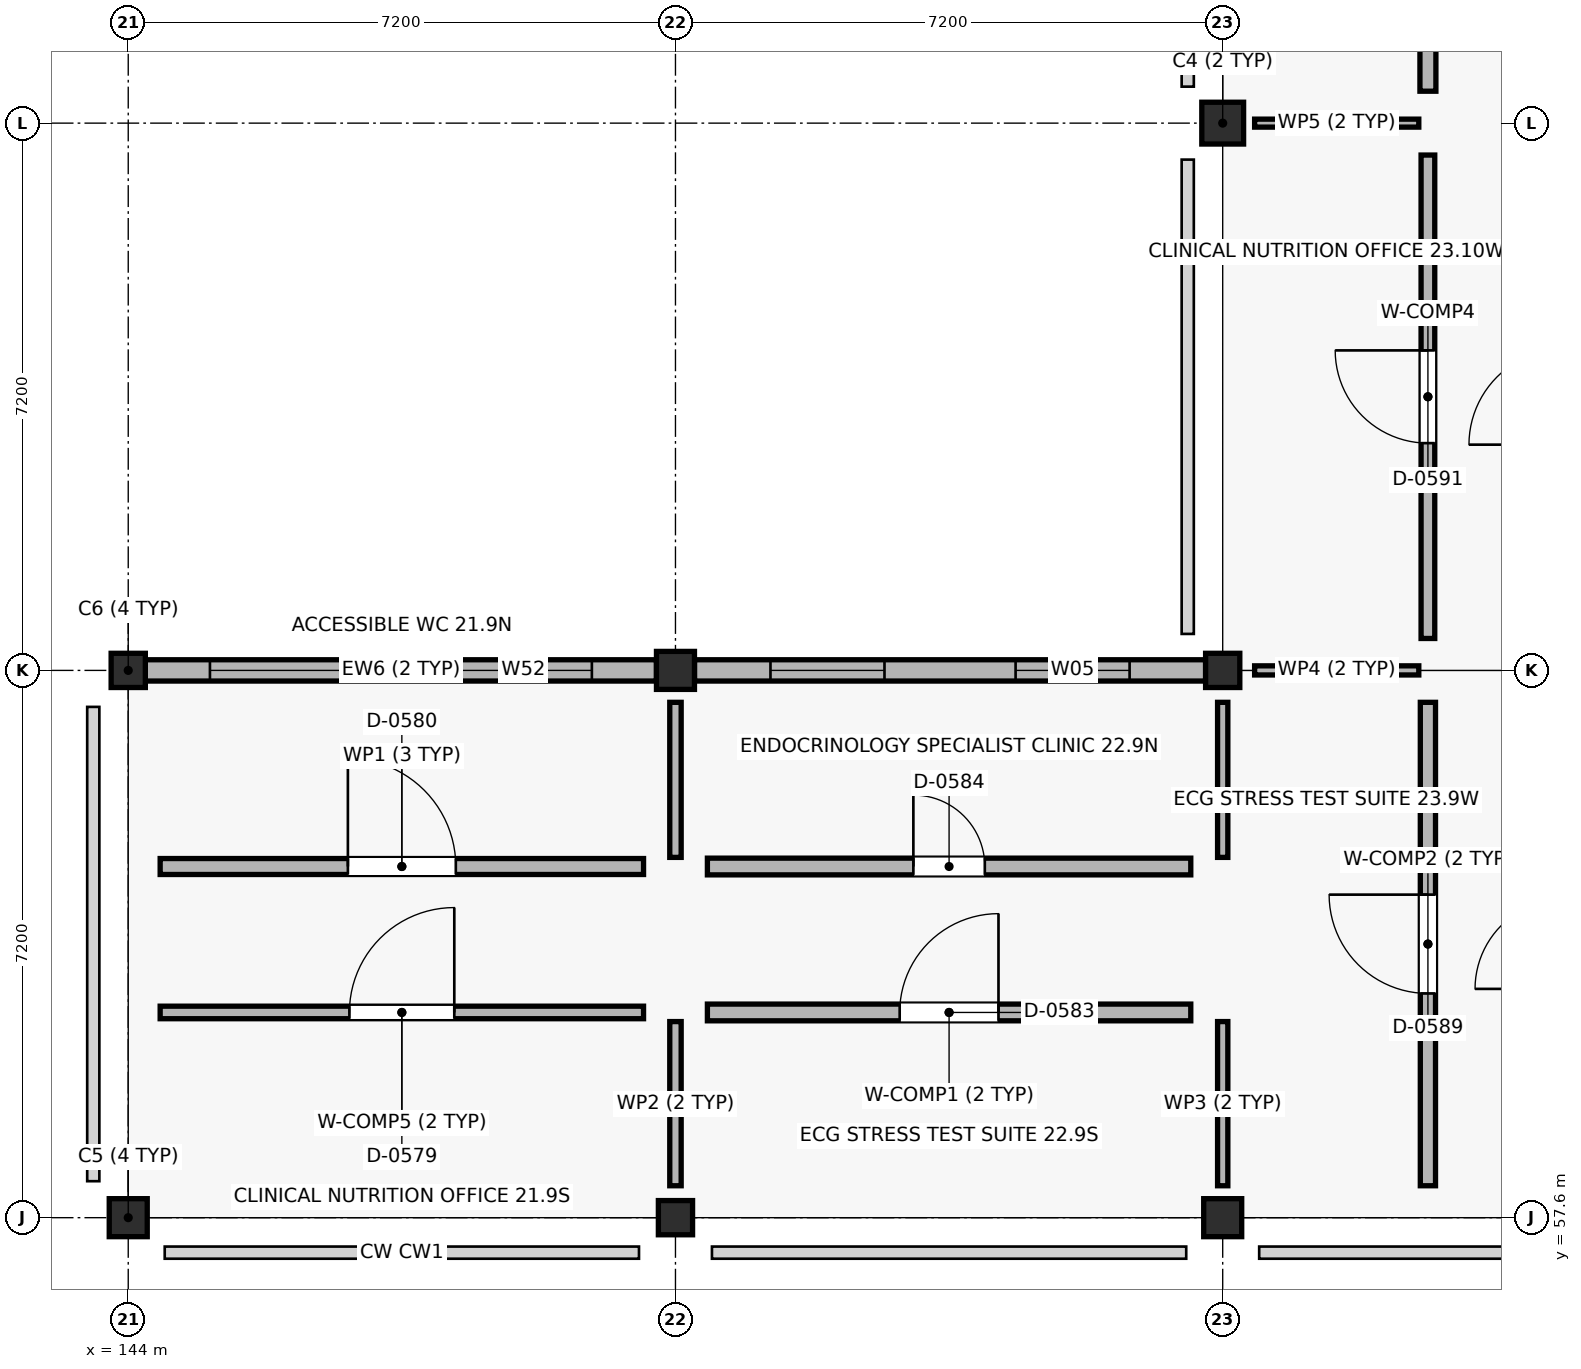
"""IFC4 building model, lengths in metres.
Left out: names, types, materials, properties, quantities, classifications, styles, units other than length and angle.
Written with IfcOpenShell. Run it as: python <this file> out.ifc"""

import sys

from ifc_helpers import new_model, si_unit, direction, frame, frame_2d, origin, origin_2d, place, context, subcontext, project, spatial, rectangle, extrude, element, fill, save


model = new_model("IFC4")
c1 = context("Model", 3, precision=1e-05, world=origin(), true_north=direction((0.0, 1.0)))
c2 = subcontext(c1, "Body", "Model", "MODEL_VIEW")
j1 = project(units=[si_unit("LENGTHUNIT", "METRE"), si_unit("PLANEANGLEUNIT", "RADIAN")], contexts=[c1])
p1 = place(None, origin())
s1 = spatial("IfcSite", under=j1, at=p1, CompositionType="ELEMENT")
p2 = place(p1, origin())
s2 = spatial("IfcBuilding", under=s1, at=p2, CompositionType="ELEMENT")
p3 = place(p2, frame((0.0, 0.0, 13.5)))
s3 = spatial("IfcBuildingStorey", under=s2, at=p3, CompositionType="ELEMENT", Elevation=13.5)
p4 = place(p3, frame((144.0, 57.6, 0.0), z_axis=(0.0, 0.0, 1.0), x_axis=(1.0, 0.0, 0.0)))
e1 = element("IfcColumn", 1, at=p4, inside=s3, PredefinedType="COLUMN", context=c2, shape_type="SweptSolid", body=[
    extrude(rectangle(XDim=0.5, YDim=0.5, at=origin_2d()), origin(), (0.0, 0.0, 1.0), 3.83),
])
for number, where, z_axis, x_axis in (
    (2, (144.0, 64.8, 0.0), (0.0, 0.0, 1.0), (1.0, 0.0, 0.0)),
    (3, (151.2, 57.6, 0.0), (0.0, 0.0, 1.0), (1.0, 0.0, 0.0)),
):
    element("IfcColumn", number, at=place(p3, frame(where, z_axis=z_axis, x_axis=x_axis)), inside=s3, PredefinedType="COLUMN", context=c2, shape_type="SweptSolid", body=[
        extrude(rectangle(XDim=0.45, YDim=0.45, at=origin_2d()), origin(), (0.0, 0.0, 1.0), 3.83),
    ])
for number, where, z_axis, x_axis in (
    (4, (151.2, 64.8, 0.0), (0.0, 0.0, 1.0), (1.0, 0.0, 0.0)),
    (5, (158.4, 57.6, 0.0), (0.0, 0.0, 1.0), (1.0, 0.0, 0.0)),
):
    element("IfcColumn", number, at=place(p3, frame(where, z_axis=z_axis, x_axis=x_axis)), inside=s3, PredefinedType="COLUMN", context=c2, shape_type="SweptSolid", body=[
        extrude(rectangle(XDim=0.5, YDim=0.5, at=origin_2d()), origin(), (0.0, 0.0, 1.0), 3.83),
    ])
p5 = place(p3, frame((158.4, 64.8, 0.0), z_axis=(0.0, 0.0, 1.0), x_axis=(1.0, 0.0, 0.0)))
e6 = element("IfcColumn", 6, at=p5, inside=s3, PredefinedType="COLUMN", context=c2, shape_type="SweptSolid", body=[
    extrude(rectangle(XDim=0.45, YDim=0.45, at=origin_2d()), origin(), (0.0, 0.0, 1.0), 3.83),
])
p6 = place(p3, frame((158.4, 72.0, 0.0), z_axis=(0.0, 0.0, 1.0), x_axis=(1.0, 0.0, 0.0)))
e7 = element("IfcColumn", 7, at=p6, inside=s3, PredefinedType="COLUMN", context=c2, shape_type="SweptSolid", body=[
    extrude(rectangle(XDim=0.55, YDim=0.55, at=origin_2d()), origin(), (0.0, 0.0, 1.0), 4.05),
])
p7 = place(p3, frame((150.95, 64.8, 0.0), z_axis=(0.0, 0.0, 1.0), x_axis=(-1.0, 0.0, 0.0)))
e8 = element("IfcWall", 8, at=p7, inside=s3, PredefinedType="STANDARD", context=c2, shape_type="SweptSolid", body=[
    extrude(rectangle(XDim=6.725, YDim=0.28, at=frame_2d((3.362, 0.0))), origin(), (0.0, 0.0, 1.0), 3.14),
])
p8 = place(p7, frame((0.85, 0.0, 0.9)))
e9 = element("IfcOpeningElement", 9, at=p8, cuts=e8, PredefinedType="OPENING", context=c2, shape_type="SweptSolid", body=[
    extrude(rectangle(XDim=1.8, YDim=1.88, at=frame_2d((0.9, 0.94))), frame((0.0, 0.15, 0.0), z_axis=(0.0, -1.0, 0.0), x_axis=(1.0, 0.0, 0.0)), (0.0, 0.0, 1.0), 0.3),
])
p9 = place(p7, frame((4.075, 0.0, 0.9)))
e10 = element("IfcOpeningElement", 10, at=p9, cuts=e8, PredefinedType="OPENING", context=c2, shape_type="SweptSolid", body=[
    extrude(rectangle(XDim=1.8, YDim=1.88, at=frame_2d((0.9, 0.94))), frame((0.0, 0.15, 0.0), z_axis=(0.0, -1.0, 0.0), x_axis=(1.0, 0.0, 0.0)), (0.0, 0.0, 1.0), 0.3),
])
p10 = place(p3, frame((158.175, 64.8, 0.0), z_axis=(0.0, 0.0, 1.0), x_axis=(-1.0, 0.0, 0.0)))
e11 = element("IfcWall", 11, at=p10, inside=s3, PredefinedType="STANDARD", context=c2, shape_type="SweptSolid", body=[
    extrude(rectangle(XDim=6.725, YDim=0.28, at=frame_2d((3.363, 0.0))), origin(), (0.0, 0.0, 1.0), 3.14),
])
p11 = place(p10, frame((1.0, 0.0, 0.9)))
e12 = element("IfcOpeningElement", 12, at=p11, cuts=e11, PredefinedType="OPENING", context=c2, shape_type="SweptSolid", body=[
    extrude(rectangle(XDim=1.5, YDim=1.25, at=frame_2d((0.75, 0.625))), frame((0.0, 0.15, 0.0), z_axis=(0.0, -1.0, 0.0), x_axis=(1.0, 0.0, 0.0)), (0.0, 0.0, 1.0), 0.3),
])
p12 = place(p10, frame((4.225, 0.0, 0.9)))
e13 = element("IfcOpeningElement", 13, at=p12, cuts=e11, PredefinedType="OPENING", context=c2, shape_type="SweptSolid", body=[
    extrude(rectangle(XDim=1.5, YDim=1.25, at=frame_2d((0.75, 0.625))), frame((0.0, 0.15, 0.0), z_axis=(0.0, -1.0, 0.0), x_axis=(1.0, 0.0, 0.0)), (0.0, 0.0, 1.0), 0.3),
])
p13 = place(p3, frame((144.42, 60.3, 0.0), z_axis=(0.0, 0.0, 1.0), x_axis=(1.0, 0.0, 0.0)))
e14 = element("IfcWall", 14, at=p13, inside=s3, PredefinedType="PARTITIONING", context=c2, shape_type="SweptSolid", body=[
    extrude(rectangle(XDim=6.36, YDim=0.165, at=frame_2d((3.18, 0.0))), origin(), (0.0, 0.0, 1.0), 2.93),
])
p14 = place(p13, frame((2.49, 0.0, 0.0)))
e15 = element("IfcOpeningElement", 15, at=p14, cuts=e14, PredefinedType="OPENING", context=c2, shape_type="SweptSolid", body=[
    extrude(rectangle(XDim=1.38, YDim=2.04, at=frame_2d((0.69, 1.02))), frame((0.0, 0.093, 0.0), z_axis=(0.0, -1.0, 0.0), x_axis=(1.0, 0.0, 0.0)), (0.0, 0.0, 1.0), 0.185),
])
p15 = place(p3, frame((151.2, 58.02, 0.0), z_axis=(0.0, 0.0, 1.0), x_axis=(0.0, 1.0, 0.0)))
e16 = element("IfcWall", 16, at=p15, inside=s3, PredefinedType="PARTITIONING", context=c2, shape_type="SweptSolid", body=[
    extrude(rectangle(XDim=2.16, YDim=0.15, at=frame_2d((1.08, 0.0))), origin(), (0.0, 0.0, 1.0), 2.93),
])
p16 = place(p3, frame((144.42, 62.22, 0.0), z_axis=(0.0, 0.0, 1.0), x_axis=(1.0, 0.0, 0.0)))
e17 = element("IfcWall", 17, at=p16, inside=s3, PredefinedType="PLUMBINGWALL", context=c2, shape_type="SweptSolid", body=[
    extrude(rectangle(XDim=6.36, YDim=0.21, at=frame_2d((3.18, 0.0))), origin(), (0.0, 0.0, 1.0), 2.93),
])
p17 = place(p16, frame((2.47, 0.0, 0.0)))
e18 = element("IfcOpeningElement", 18, at=p17, cuts=e17, PredefinedType="OPENING", context=c2, shape_type="SweptSolid", body=[
    extrude(rectangle(XDim=1.42, YDim=2.04, at=frame_2d((0.71, 1.02))), frame((0.0, 0.115, 0.0), z_axis=(0.0, -1.0, 0.0), x_axis=(1.0, 0.0, 0.0)), (0.0, 0.0, 1.0), 0.23),
])
p18 = place(p3, frame((151.2, 62.34, 0.0), z_axis=(0.0, 0.0, 1.0), x_axis=(0.0, 1.0, 0.0)))
e19 = element("IfcWall", 19, at=p18, inside=s3, PredefinedType="PARTITIONING", context=c2, shape_type="SweptSolid", body=[
    extrude(rectangle(XDim=2.04, YDim=0.15, at=frame_2d((1.02, 0.0))), origin(), (0.0, 0.0, 1.0), 2.93),
])
p19 = place(p3, frame((151.62, 60.3, 0.0), z_axis=(0.0, 0.0, 1.0), x_axis=(1.0, 0.0, 0.0)))
e20 = element("IfcWall", 20, at=p19, inside=s3, PredefinedType="SOLIDWALL", context=c2, shape_type="SweptSolid", body=[
    extrude(rectangle(XDim=6.36, YDim=0.22, at=frame_2d((3.18, 0.0))), origin(), (0.0, 0.0, 1.0), 2.93),
])
p20 = place(p19, frame((2.53, 0.0, 0.0)))
e21 = element("IfcOpeningElement", 21, at=p20, cuts=e20, PredefinedType="OPENING", context=c2, shape_type="SweptSolid", body=[
    extrude(rectangle(XDim=1.3, YDim=2.15, at=frame_2d((0.65, 1.075))), frame((0.0, 0.12, 0.0), z_axis=(0.0, -1.0, 0.0), x_axis=(1.0, 0.0, 0.0)), (0.0, 0.0, 1.0), 0.24),
])
p21 = place(p3, frame((158.4, 58.02, 0.0), z_axis=(0.0, 0.0, 1.0), x_axis=(0.0, 1.0, 0.0)))
e22 = element("IfcWall", 22, at=p21, inside=s3, PredefinedType="PARTITIONING", context=c2, shape_type="SweptSolid", body=[
    extrude(rectangle(XDim=2.16, YDim=0.135, at=frame_2d((1.08, 0.0))), origin(), (0.0, 0.0, 1.0), 2.93),
])
p22 = place(p3, frame((151.62, 62.22, 0.0), z_axis=(0.0, 0.0, 1.0), x_axis=(1.0, 0.0, 0.0)))
e23 = element("IfcWall", 23, at=p22, inside=s3, PredefinedType="SOLIDWALL", context=c2, shape_type="SweptSolid", body=[
    extrude(rectangle(XDim=6.36, YDim=0.22, at=frame_2d((3.18, 0.0))), origin(), (0.0, 0.0, 1.0), 2.93),
])
p23 = place(p22, frame((2.71, 0.0, 0.0)))
e24 = element("IfcOpeningElement", 24, at=p23, cuts=e23, PredefinedType="OPENING", context=c2, shape_type="SweptSolid", body=[
    extrude(rectangle(XDim=0.94, YDim=2.09, at=frame_2d((0.47, 1.045))), frame((0.0, 0.12, 0.0), z_axis=(0.0, -1.0, 0.0), x_axis=(1.0, 0.0, 0.0)), (0.0, 0.0, 1.0), 0.24),
])
p24 = place(p3, frame((158.4, 62.34, 0.0), z_axis=(0.0, 0.0, 1.0), x_axis=(0.0, 1.0, 0.0)))
e25 = element("IfcWall", 25, at=p24, inside=s3, PredefinedType="PARTITIONING", context=c2, shape_type="SweptSolid", body=[
    extrude(rectangle(XDim=2.04, YDim=0.135, at=frame_2d((1.02, 0.0))), origin(), (0.0, 0.0, 1.0), 2.93),
])
p25 = place(p3, frame((161.1, 58.02, 0.0), z_axis=(0.0, 0.0, 1.0), x_axis=(0.0, 1.0, 0.0)))
e26 = element("IfcWall", 26, at=p25, inside=s3, PredefinedType="SOLIDWALL", context=c2, shape_type="SweptSolid", body=[
    extrude(rectangle(XDim=6.36, YDim=0.2, at=frame_2d((3.18, 0.0))), origin(), (0.0, 0.0, 1.0), 2.93),
])
p26 = place(p25, frame((2.53, 0.0, 0.0)))
e27 = element("IfcOpeningElement", 27, at=p26, cuts=e26, PredefinedType="OPENING", context=c2, shape_type="SweptSolid", body=[
    extrude(rectangle(XDim=1.3, YDim=2.15, at=frame_2d((0.65, 1.075))), frame((0.0, 0.11, 0.0), z_axis=(0.0, -1.0, 0.0), x_axis=(1.0, 0.0, 0.0)), (0.0, 0.0, 1.0), 0.22),
])
p27 = place(p3, frame((158.82, 64.8, 0.0), z_axis=(0.0, 0.0, 1.0), x_axis=(1.0, 0.0, 0.0)))
e28 = element("IfcWall", 28, at=p27, inside=s3, PredefinedType="PARTITIONING", context=c2, shape_type="SweptSolid", body=[
    extrude(rectangle(XDim=2.16, YDim=0.12, at=frame_2d((1.08, 0.0))), origin(), (0.0, 0.0, 1.0), 2.93),
])
p28 = place(p3, frame((161.1, 65.22, 0.0), z_axis=(0.0, 0.0, 1.0), x_axis=(0.0, 1.0, 0.0)))
e29 = element("IfcWall", 29, at=p28, inside=s3, PredefinedType="PARTITIONING", context=c2, shape_type="SweptSolid", body=[
    extrude(rectangle(XDim=6.36, YDim=0.18, at=frame_2d((3.18, 0.0))), origin(), (0.0, 0.0, 1.0), 2.93),
])
p29 = place(p28, frame((2.57, 0.0, 0.0)))
e30 = element("IfcOpeningElement", 30, at=p29, cuts=e29, PredefinedType="OPENING", context=c2, shape_type="SweptSolid", body=[
    extrude(rectangle(XDim=1.22, YDim=2.09, at=frame_2d((0.61, 1.045))), frame((0.0, 0.1, 0.0), z_axis=(0.0, -1.0, 0.0), x_axis=(1.0, 0.0, 0.0)), (0.0, 0.0, 1.0), 0.2),
])
p30 = place(p3, frame((158.82, 72.0, 0.0), z_axis=(0.0, 0.0, 1.0), x_axis=(1.0, 0.0, 0.0)))
e31 = element("IfcWall", 31, at=p30, inside=s3, PredefinedType="PARTITIONING", context=c2, shape_type="SweptSolid", body=[
    extrude(rectangle(XDim=2.16, YDim=0.105, at=frame_2d((1.08, 0.0))), origin(), (0.0, 0.0, 1.0), 2.93),
])
p31 = place(p3, frame((161.1, 72.42, 0.0), z_axis=(0.0, 0.0, 1.0), x_axis=(0.0, 1.0, 0.0)))
e32 = element("IfcWall", 32, at=p31, inside=s3, PredefinedType="PLUMBINGWALL", context=c2, shape_type="SweptSolid", body=[
    extrude(rectangle(XDim=6.36, YDim=0.21, at=frame_2d((3.18, 0.0))), origin(), (0.0, 0.0, 1.0), 2.93),
])
p32 = place(p31, frame((2.53, 0.0, 0.0)))
e33 = element("IfcOpeningElement", 33, at=p32, cuts=e32, PredefinedType="OPENING", context=c2, shape_type="SweptSolid", body=[
    extrude(rectangle(XDim=1.3, YDim=2.09, at=frame_2d((0.65, 1.045))), frame((0.0, 0.115, 0.0), z_axis=(0.0, -1.0, 0.0), x_axis=(1.0, 0.0, 0.0)), (0.0, 0.0, 1.0), 0.23),
])
p33 = place(p8, origin())
e34 = element("IfcWindow", 34, at=p33, inside=s3, PartitioningType="SINGLE_PANEL", PredefinedType="WINDOW", context=c2, shape_type="SweptSolid", body=[
    extrude(rectangle(XDim=1.8, YDim=1.88, at=frame_2d((0.9, 0.94))), frame((0.0, 0.03, 0.0), z_axis=(0.0, -1.0, 0.0), x_axis=(1.0, 0.0, 0.0)), (0.0, 0.0, 1.0), 0.06),
])
fill(e9, e34)
p34 = place(p9, origin())
e35 = element("IfcWindow", 35, at=p34, inside=s3, PartitioningType="SINGLE_PANEL", PredefinedType="WINDOW", context=c2, shape_type="SweptSolid", body=[
    extrude(rectangle(XDim=1.8, YDim=1.88, at=frame_2d((0.9, 0.94))), frame((0.0, 0.03, 0.0), z_axis=(0.0, -1.0, 0.0), x_axis=(1.0, 0.0, 0.0)), (0.0, 0.0, 1.0), 0.06),
])
fill(e10, e35)
p35 = place(p11, origin())
e36 = element("IfcWindow", 36, at=p35, inside=s3, PartitioningType="SINGLE_PANEL", PredefinedType="WINDOW", context=c2, shape_type="SweptSolid", body=[
    extrude(rectangle(XDim=1.5, YDim=1.25, at=frame_2d((0.75, 0.625))), frame((0.0, 0.03, 0.0), z_axis=(0.0, -1.0, 0.0), x_axis=(1.0, 0.0, 0.0)), (0.0, 0.0, 1.0), 0.06),
])
fill(e12, e36)
p36 = place(p12, origin())
e37 = element("IfcWindow", 37, at=p36, inside=s3, PartitioningType="SINGLE_PANEL", PredefinedType="WINDOW", context=c2, shape_type="SweptSolid", body=[
    extrude(rectangle(XDim=1.5, YDim=1.25, at=frame_2d((0.75, 0.625))), frame((0.0, 0.03, 0.0), z_axis=(0.0, -1.0, 0.0), x_axis=(1.0, 0.0, 0.0)), (0.0, 0.0, 1.0), 0.06),
])
fill(e13, e37)
p37 = place(p14, origin())
e38 = element("IfcDoor", 38, at=p37, inside=s3, OperationType="SINGLE_SWING_RIGHT", PredefinedType="DOOR", context=c2, shape_type="SweptSolid", body=[
    extrude(rectangle(XDim=1.38, YDim=2.04, at=frame_2d((0.69, 1.02))), frame((0.0, 0.025, 0.0), z_axis=(0.0, -1.0, 0.0), x_axis=(1.0, 0.0, 0.0)), (0.0, 0.0, 1.0), 0.05),
])
fill(e15, e38)
p38 = place(p17, origin())
e39 = element("IfcDoor", 39, at=p38, inside=s3, OperationType="SINGLE_SWING_LEFT", PredefinedType="DOOR", context=c2, shape_type="SweptSolid", body=[
    extrude(rectangle(XDim=1.42, YDim=2.04, at=frame_2d((0.71, 1.02))), frame((0.0, 0.025, 0.0), z_axis=(0.0, -1.0, 0.0), x_axis=(1.0, 0.0, 0.0)), (0.0, 0.0, 1.0), 0.05),
])
fill(e18, e39)
p39 = place(p20, origin())
e40 = element("IfcDoor", 40, at=p39, inside=s3, OperationType="SINGLE_SWING_RIGHT", PredefinedType="DOOR", context=c2, shape_type="SweptSolid", body=[
    extrude(rectangle(XDim=1.3, YDim=2.15, at=frame_2d((0.65, 1.075))), frame((0.0, 0.025, 0.0), z_axis=(0.0, -1.0, 0.0), x_axis=(1.0, 0.0, 0.0)), (0.0, 0.0, 1.0), 0.05),
])
fill(e21, e40)
p40 = place(p23, origin())
e41 = element("IfcDoor", 41, at=p40, inside=s3, OperationType="SINGLE_SWING_LEFT", PredefinedType="DOOR", context=c2, shape_type="SweptSolid", body=[
    extrude(rectangle(XDim=0.94, YDim=2.09, at=frame_2d((0.47, 1.045))), frame((0.0, 0.025, 0.0), z_axis=(0.0, -1.0, 0.0), x_axis=(1.0, 0.0, 0.0)), (0.0, 0.0, 1.0), 0.05),
])
fill(e24, e41)
p41 = place(p26, origin())
e42 = element("IfcDoor", 42, at=p41, inside=s3, OperationType="SINGLE_SWING_RIGHT", PredefinedType="DOOR", context=c2, shape_type="SweptSolid", body=[
    extrude(rectangle(XDim=1.3, YDim=2.15, at=frame_2d((0.65, 1.075))), frame((0.0, 0.025, 0.0), z_axis=(0.0, -1.0, 0.0), x_axis=(1.0, 0.0, 0.0)), (0.0, 0.0, 1.0), 0.05),
])
fill(e27, e42)
p42 = place(p29, origin())
e43 = element("IfcDoor", 43, at=p42, inside=s3, OperationType="SINGLE_SWING_RIGHT", PredefinedType="DOOR", context=c2, shape_type="SweptSolid", body=[
    extrude(rectangle(XDim=1.22, YDim=2.09, at=frame_2d((0.61, 1.045))), frame((0.0, 0.025, 0.0), z_axis=(0.0, -1.0, 0.0), x_axis=(1.0, 0.0, 0.0)), (0.0, 0.0, 1.0), 0.05),
])
fill(e30, e43)
save(model, sys.argv[1])
